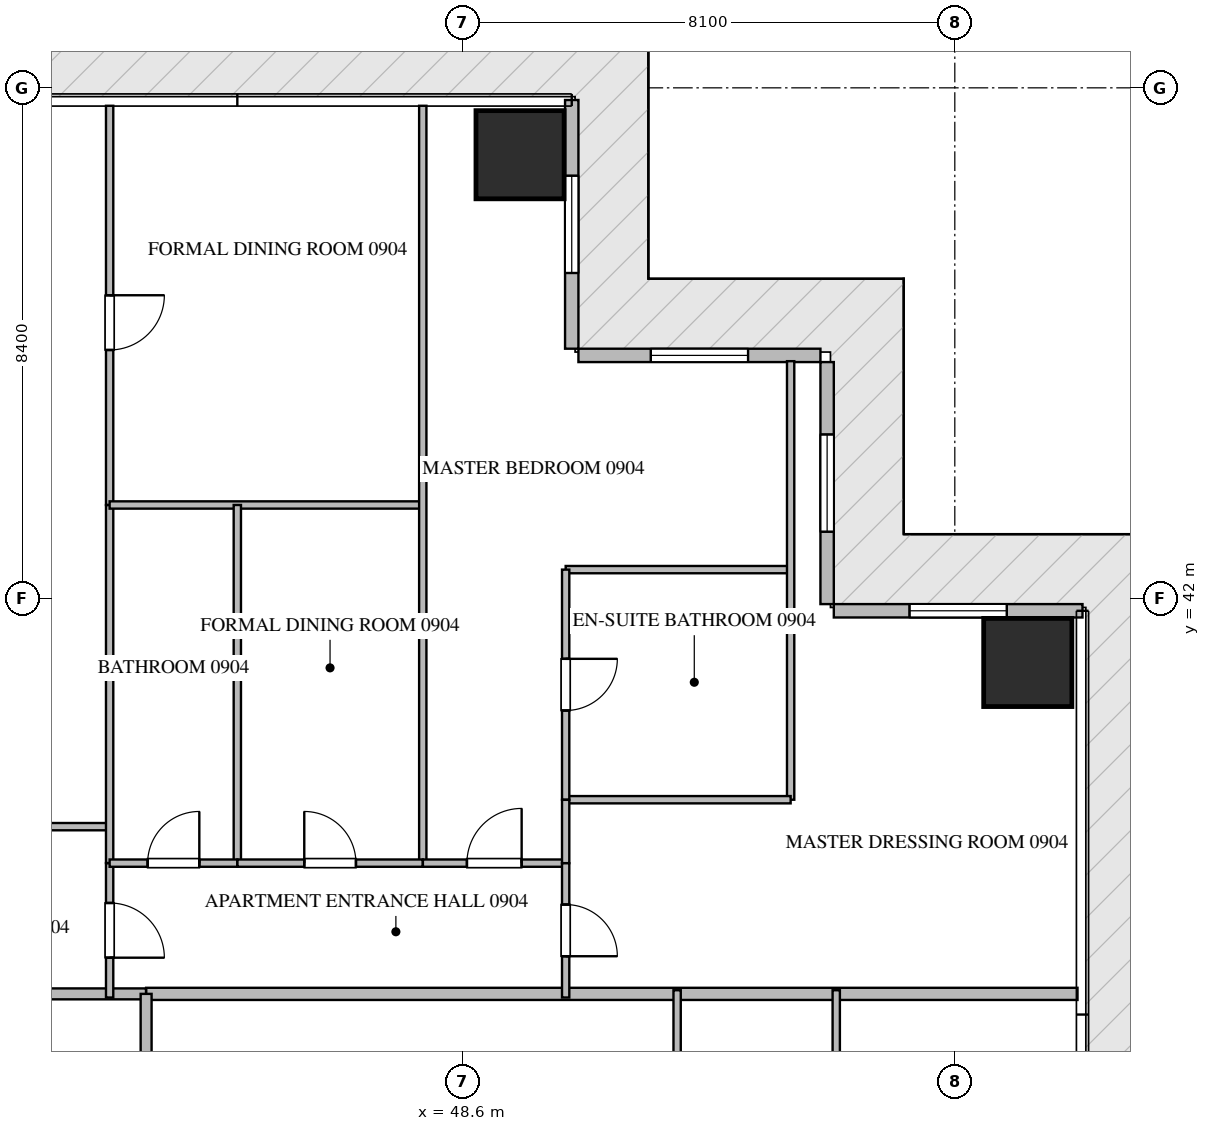
"""IFC4 building model, lengths in metres.
Left out: names, types, materials, properties, quantities, classifications, styles, units other than length and angle.
Written with IfcOpenShell. Run it as: python <this file> out.ifc"""

import sys

from ifc_helpers import new_model, si_unit, direction, frame, frame_2d, origin, origin_2d, place, context, subcontext, project, spatial, rectangle, extrude, source, transform, mapped, element, fill, save


model = new_model("IFC4")
c1 = context("Model", 3, precision=1e-05, world=origin(), true_north=direction((0.0, 1.0)))
c2 = subcontext(c1, "Body", "Model", "MODEL_VIEW")
j1 = project(units=[si_unit("LENGTHUNIT", "METRE"), si_unit("PLANEANGLEUNIT", "RADIAN")], contexts=[c1])
p1 = place(None, origin())
s1 = spatial("IfcSite", under=j1, at=p1, CompositionType="ELEMENT")
p2 = place(p1, origin())
s2 = spatial("IfcBuilding", under=s1, at=p2, CompositionType="ELEMENT")
p3 = place(p2, frame((0.0, 0.0, 41.7)))
s3 = spatial("IfcBuildingStorey", under=s2, at=p3, CompositionType="ELEMENT", Elevation=41.7)
m1 = source(origin(), c2, "Body", "SweptSolid", [
    extrude(rectangle(XDim=1.45, YDim=1.45, at=origin_2d()), origin(), (0.0, 0.0, 1.0), 3.75),
])
for number, where, z_axis, x_axis in (
    (1, (49.55, 49.3, -0.26), (0.0, 0.0, 1.0), (1.0, 0.0, 0.0)),
    (2, (57.9, 40.95, -0.26), (0.0, 0.0, 1.0), (1.0, 0.0, 0.0)),
):
    element("IfcColumn", number, at=place(p3, frame(where, z_axis=z_axis, x_axis=x_axis)), inside=s3, PredefinedType="COLUMN", context=c2, shape_type="MappedRepresentation", body=[
        mapped(m1, transform((0.0, 0.0, 0.0), scale=1.0)),
    ])
p4 = place(p3, frame((58.8, 41.8, 0.0), z_axis=(0.0, 0.0, 1.0), x_axis=(-1.0, 0.0, 0.0)))
e3 = element("IfcWall", 3, at=p4, inside=s3, PredefinedType="ELEMENTEDWALL", context=c2, shape_type="SweptSolid", body=[
    extrude(rectangle(XDim=4.09, YDim=0.22, at=frame_2d((2.045, 0.0))), origin(), (0.0, 0.0, 1.0), 3.475),
])
p5 = place(p4, frame((1.245, 0.0, 0.65)))
e4 = element("IfcOpeningElement", 4, at=p5, cuts=e3, PredefinedType="OPENING", context=c2, shape_type="SweptSolid", body=[
    extrude(rectangle(XDim=1.6, YDim=2.1, at=frame_2d((0.8, 1.05))), frame((0.0, 0.12, 0.0), z_axis=(0.0, -1.0, 0.0), x_axis=(1.0, 0.0, 0.0)), (0.0, 0.0, 1.0), 0.24),
])
p6 = place(p3, frame((54.6, 41.91, 0.0), z_axis=(0.0, 0.0, 1.0), x_axis=(0.0, 1.0, 0.0)))
e5 = element("IfcWall", 5, at=p6, inside=s3, PredefinedType="ELEMENTEDWALL", context=c2, shape_type="SweptSolid", body=[
    extrude(rectangle(XDim=3.98, YDim=0.22, at=frame_2d((1.99, 0.0))), origin(), (0.0, 0.0, 1.0), 3.475),
])
p7 = place(p6, frame((1.19, 0.0, 0.65)))
e6 = element("IfcOpeningElement", 6, at=p7, cuts=e5, PredefinedType="OPENING", context=c2, shape_type="SweptSolid", body=[
    extrude(rectangle(XDim=1.6, YDim=2.1, at=frame_2d((0.8, 1.05))), frame((0.0, 0.12, 0.0), z_axis=(0.0, -1.0, 0.0), x_axis=(1.0, 0.0, 0.0)), (0.0, 0.0, 1.0), 0.24),
])
p8 = place(p3, frame((54.49, 46.0, 0.0), z_axis=(0.0, 0.0, 1.0), x_axis=(-1.0, 0.0, 0.0)))
e7 = element("IfcWall", 7, at=p8, inside=s3, PredefinedType="ELEMENTEDWALL", context=c2, shape_type="SweptSolid", body=[
    extrude(rectangle(XDim=3.98, YDim=0.22, at=frame_2d((1.99, 0.0))), origin(), (0.0, 0.0, 1.0), 3.475),
])
p9 = place(p8, frame((1.19, 0.0, 0.65)))
e8 = element("IfcOpeningElement", 8, at=p9, cuts=e7, PredefinedType="OPENING", context=c2, shape_type="SweptSolid", body=[
    extrude(rectangle(XDim=1.6, YDim=2.1, at=frame_2d((0.8, 1.05))), frame((0.0, 0.12, 0.0), z_axis=(0.0, -1.0, 0.0), x_axis=(1.0, 0.0, 0.0)), (0.0, 0.0, 1.0), 0.24),
])
p10 = place(p3, frame((50.4, 46.11, 0.0), z_axis=(0.0, 0.0, 1.0), x_axis=(0.0, 1.0, 0.0)))
e9 = element("IfcWall", 9, at=p10, inside=s3, PredefinedType="ELEMENTEDWALL", context=c2, shape_type="SweptSolid", body=[
    extrude(rectangle(XDim=4.09, YDim=0.22, at=frame_2d((2.045, 0.0))), origin(), (0.0, 0.0, 1.0), 3.475),
])
p11 = place(p10, frame((1.245, 0.0, 0.65)))
e10 = element("IfcOpeningElement", 10, at=p11, cuts=e9, PredefinedType="OPENING", context=c2, shape_type="SweptSolid", body=[
    extrude(rectangle(XDim=1.6, YDim=2.1, at=frame_2d((0.8, 1.05))), frame((0.0, 0.12, 0.0), z_axis=(0.0, -1.0, 0.0), x_axis=(1.0, 0.0, 0.0)), (0.0, 0.0, 1.0), 0.24),
])
p12 = place(p3, frame((43.4, 35.5, 0.0), z_axis=(0.0, 0.0, 1.0), x_axis=(1.0, 0.0, 0.0)))
e11 = element("IfcWall", 11, at=p12, inside=s3, PredefinedType="PARTITIONING", context=c2, shape_type="SweptSolid", body=[
    extrude(rectangle(XDim=15.318, YDim=0.2, at=frame_2d((7.659, 0.0))), origin(), (0.0, 0.0, 1.0), 3.49),
])
p13 = place(p3, frame((21.402, 35.5, 0.0), z_axis=(0.0, 0.0, 1.0), x_axis=(1.0, 0.0, 0.0)))
e12 = element("IfcWall", 12, at=p13, inside=s3, PredefinedType="PARTITIONING", context=c2, shape_type="SweptSolid", body=[
    extrude(rectangle(XDim=21.996, YDim=0.18, at=frame_2d((10.998, 0.0))), origin(), (0.0, 0.0, 1.0), 3.49),
])
p14 = place(p13, frame((9.952, 0.0, 0.0)))
e13 = element("IfcOpeningElement", 13, at=p14, cuts=e12, PredefinedType="OPENING", context=c2, shape_type="SweptSolid", body=[
    extrude(rectangle(XDim=1.0, YDim=2.15, at=frame_2d((0.5, 1.075))), frame((0.0, 0.1, 0.0), z_axis=(0.0, -1.0, 0.0), x_axis=(1.0, 0.0, 0.0)), (0.0, 0.0, 1.0), 0.2),
])
p15 = place(p13, frame((15.18, 0.0, 0.0)))
e14 = element("IfcOpeningElement", 14, at=p15, cuts=e12, PredefinedType="OPENING", context=c2, shape_type="SweptSolid", body=[
    extrude(rectangle(XDim=1.0, YDim=2.15, at=frame_2d((0.5, 1.075))), frame((0.0, 0.1, 0.0), z_axis=(0.0, -1.0, 0.0), x_axis=(1.0, 0.0, 0.0)), (0.0, 0.0, 1.0), 0.2),
])
p16 = place(p3, frame((43.4, 14.9, 0.0), z_axis=(0.0, 0.0, 1.0), x_axis=(0.0, 1.0, 0.0)))
e15 = element("IfcWall", 15, at=p16, inside=s3, PredefinedType="PARTITIONING", context=c2, shape_type="SweptSolid", body=[
    extrude(rectangle(XDim=20.6, YDim=0.18, at=frame_2d((10.3, 0.0))), origin(), (0.0, 0.0, 1.0), 3.49),
])
p17 = place(p16, frame((1.96, 0.0, 0.0)))
e16 = element("IfcOpeningElement", 16, at=p17, cuts=e15, PredefinedType="OPENING", context=c2, shape_type="SweptSolid", body=[
    extrude(rectangle(XDim=1.0, YDim=2.15, at=frame_2d((0.5, 1.075))), frame((0.0, 0.1, 0.0), z_axis=(0.0, -1.0, 0.0), x_axis=(1.0, 0.0, 0.0)), (0.0, 0.0, 1.0), 0.2),
])
p18 = place(p3, frame((39.95, 38.25, 0.0), z_axis=(0.0, 0.0, 1.0), x_axis=(1.0, 0.0, 0.0)))
e17 = element("IfcWall", 17, at=p18, inside=s3, PredefinedType="PARTITIONING", context=c2, shape_type="SweptSolid", body=[
    extrude(rectangle(XDim=2.85, YDim=0.12, at=frame_2d((1.425, 0.0))), origin(), (0.0, 0.0, 1.0), 3.49),
])
p19 = place(p18, frame((1.0, 0.0, 0.0)))
e18 = element("IfcOpeningElement", 18, at=p19, cuts=e17, PredefinedType="OPENING", context=c2, shape_type="SweptSolid", body=[
    extrude(rectangle(XDim=0.85, YDim=2.1, at=frame_2d((0.425, 1.05))), frame((0.0, 0.07, 0.0), z_axis=(0.0, -1.0, 0.0), x_axis=(1.0, 0.0, 0.0)), (0.0, 0.0, 1.0), 0.14),
])
p20 = place(p3, frame((42.8, 37.65, 0.0), z_axis=(0.0, 0.0, 1.0), x_axis=(0.0, -1.0, 0.0)))
e19 = element("IfcWall", 19, at=p20, inside=s3, PredefinedType="PARTITIONING", context=c2, shape_type="SweptSolid", body=[
    extrude(rectangle(XDim=2.21, YDim=0.12, at=frame_2d((1.105, 0.0))), origin(), (0.0, 0.0, 1.0), 3.49),
])
p21 = place(p20, frame((0.655, 0.0, 0.0)))
e20 = element("IfcOpeningElement", 20, at=p21, cuts=e19, PredefinedType="OPENING", context=c2, shape_type="SweptSolid", body=[
    extrude(rectangle(XDim=0.9, YDim=2.1, at=frame_2d((0.45, 1.05))), frame((0.0, 0.07, 0.0), z_axis=(0.0, -1.0, 0.0), x_axis=(1.0, 0.0, 0.0)), (0.0, 0.0, 1.0), 0.14),
])
p22 = place(p3, frame((42.8, 50.105, 0.0), z_axis=(0.0, 0.0, 1.0), x_axis=(0.0, -1.0, 0.0)))
e21 = element("IfcWall", 21, at=p22, inside=s3, PredefinedType="PARTITIONING", context=c2, shape_type="SweptSolid", body=[
    extrude(rectangle(XDim=6.565, YDim=0.12, at=frame_2d((3.282, 0.0))), origin(), (0.0, 0.0, 1.0), 3.49),
])
p23 = place(p22, frame((3.116, 0.0, 0.0)))
e22 = element("IfcOpeningElement", 22, at=p23, cuts=e21, PredefinedType="OPENING", context=c2, shape_type="SweptSolid", body=[
    extrude(rectangle(XDim=0.9, YDim=2.1, at=frame_2d((0.45, 1.05))), frame((0.0, 0.07, 0.0), z_axis=(0.0, -1.0, 0.0), x_axis=(1.0, 0.0, 0.0)), (0.0, 0.0, 1.0), 0.14),
])
p24 = place(p3, frame((42.8, 43.538, 0.0), z_axis=(0.0, 0.0, 1.0), x_axis=(0.0, -1.0, 0.0)))
e23 = element("IfcWall", 23, at=p24, inside=s3, PredefinedType="PARTITIONING", context=c2, shape_type="SweptSolid", body=[
    extrude(rectangle(XDim=5.886, YDim=0.12, at=frame_2d((2.943, 0.0))), origin(), (0.0, 0.0, 1.0), 3.49),
])
p25 = place(p3, frame((42.8, 43.54, 0.0), z_axis=(0.0, 0.0, 1.0), x_axis=(1.0, 0.0, 0.0)))
e24 = element("IfcWall", 24, at=p25, inside=s3, PredefinedType="PARTITIONING", context=c2, shape_type="SweptSolid", body=[
    extrude(rectangle(XDim=5.15, YDim=0.12, at=frame_2d((2.575, 0.0))), origin(), (0.0, 0.0, 1.0), 3.49),
])
p26 = place(p3, frame((47.95, 50.105, 0.0), z_axis=(0.0, 0.0, 1.0), x_axis=(0.0, -1.0, 0.0)))
e25 = element("IfcWall", 25, at=p26, inside=s3, PredefinedType="PARTITIONING", context=c2, shape_type="SweptSolid", body=[
    extrude(rectangle(XDim=12.455, YDim=0.12, at=frame_2d((6.228, 0.0))), origin(), (0.0, 0.0, 1.0), 3.49),
])
p27 = place(p3, frame((44.9, 43.54, 0.0), z_axis=(0.0, 0.0, 1.0), x_axis=(0.0, -1.0, 0.0)))
e26 = element("IfcWall", 26, at=p27, inside=s3, PredefinedType="PARTITIONING", context=c2, shape_type="SweptSolid", body=[
    extrude(rectangle(XDim=5.89, YDim=0.12, at=frame_2d((2.945, 0.0))), origin(), (0.0, 0.0, 1.0), 3.49),
])
p28 = place(p3, frame((42.8, 37.65, 0.0), z_axis=(0.0, 0.0, 1.0), x_axis=(1.0, 0.0, 0.0)))
e27 = element("IfcWall", 27, at=p28, inside=s3, PredefinedType="PARTITIONING", context=c2, shape_type="SweptSolid", body=[
    extrude(rectangle(XDim=2.1, YDim=0.12, at=frame_2d((1.05, 0.0))), origin(), (0.0, 0.0, 1.0), 3.49),
])
p29 = place(p28, frame((0.625, 0.0, 0.0)))
e28 = element("IfcOpeningElement", 28, at=p29, cuts=e27, PredefinedType="OPENING", context=c2, shape_type="SweptSolid", body=[
    extrude(rectangle(XDim=0.85, YDim=2.1, at=frame_2d((0.425, 1.05))), frame((0.0, 0.07, 0.0), z_axis=(0.0, -1.0, 0.0), x_axis=(1.0, 0.0, 0.0)), (0.0, 0.0, 1.0), 0.14),
])
p30 = place(p3, frame((44.902, 37.65, 0.0), z_axis=(0.0, 0.0, 1.0), x_axis=(1.0, 0.0, 0.0)))
e29 = element("IfcWall", 29, at=p30, inside=s3, PredefinedType="PARTITIONING", context=c2, shape_type="SweptSolid", body=[
    extrude(rectangle(XDim=3.048, YDim=0.12, at=frame_2d((1.524, 0.0))), origin(), (0.0, 0.0, 1.0), 3.49),
])
p31 = place(p30, frame((1.099, 0.0, 0.0)))
e30 = element("IfcOpeningElement", 30, at=p31, cuts=e29, PredefinedType="OPENING", context=c2, shape_type="SweptSolid", body=[
    extrude(rectangle(XDim=0.85, YDim=2.1, at=frame_2d((0.425, 1.05))), frame((0.0, 0.07, 0.0), z_axis=(0.0, -1.0, 0.0), x_axis=(1.0, 0.0, 0.0)), (0.0, 0.0, 1.0), 0.14),
])
p32 = place(p3, frame((47.952, 37.65, 0.0), z_axis=(0.0, 0.0, 1.0), x_axis=(1.0, 0.0, 0.0)))
e31 = element("IfcWall", 31, at=p32, inside=s3, PredefinedType="PARTITIONING", context=c2, shape_type="SweptSolid", body=[
    extrude(rectangle(XDim=2.348, YDim=0.12, at=frame_2d((1.174, 0.0))), origin(), (0.0, 0.0, 1.0), 3.49),
])
p33 = place(p32, frame((0.724, 0.0, 0.0)))
e32 = element("IfcOpeningElement", 32, at=p33, cuts=e31, PredefinedType="OPENING", context=c2, shape_type="SweptSolid", body=[
    extrude(rectangle(XDim=0.9, YDim=2.1, at=frame_2d((0.45, 1.05))), frame((0.0, 0.07, 0.0), z_axis=(0.0, -1.0, 0.0), x_axis=(1.0, 0.0, 0.0)), (0.0, 0.0, 1.0), 0.14),
])
p34 = place(p3, frame((50.3, 42.477, 0.0), z_axis=(0.0, 0.0, 1.0), x_axis=(1.0, 0.0, 0.0)))
e33 = element("IfcWall", 33, at=p34, inside=s3, PredefinedType="PARTITIONING", context=c2, shape_type="SweptSolid", body=[
    extrude(rectangle(XDim=3.7, YDim=0.12, at=frame_2d((1.85, 0.0))), origin(), (0.0, 0.0, 1.0), 3.49),
])
p35 = place(p3, frame((54.0, 45.905, 0.0), z_axis=(0.0, 0.0, 1.0), x_axis=(0.0, -1.0, 0.0)))
e34 = element("IfcWall", 34, at=p35, inside=s3, PredefinedType="PARTITIONING", context=c2, shape_type="SweptSolid", body=[
    extrude(rectangle(XDim=7.212, YDim=0.12, at=frame_2d((3.606, 0.0))), origin(), (0.0, 0.0, 1.0), 3.49),
])
p36 = place(p3, frame((50.3, 38.693, 0.0), z_axis=(0.0, 0.0, 1.0), x_axis=(1.0, 0.0, 0.0)))
e35 = element("IfcWall", 35, at=p36, inside=s3, PredefinedType="PARTITIONING", context=c2, shape_type="SweptSolid", body=[
    extrude(rectangle(XDim=3.7, YDim=0.12, at=frame_2d((1.85, 0.0))), origin(), (0.0, 0.0, 1.0), 3.49),
])
p37 = place(p3, frame((50.3, 42.477, 0.0), z_axis=(0.0, 0.0, 1.0), x_axis=(0.0, -1.0, 0.0)))
e36 = element("IfcWall", 36, at=p37, inside=s3, PredefinedType="PARTITIONING", context=c2, shape_type="SweptSolid", body=[
    extrude(rectangle(XDim=3.784, YDim=0.12, at=frame_2d((1.892, 0.0))), origin(), (0.0, 0.0, 1.0), 3.49),
])
p38 = place(p37, frame((1.467, 0.0, 0.0)))
e37 = element("IfcOpeningElement", 37, at=p38, cuts=e36, PredefinedType="OPENING", context=c2, shape_type="SweptSolid", body=[
    extrude(rectangle(XDim=0.85, YDim=2.1, at=frame_2d((0.425, 1.05))), frame((0.0, 0.07, 0.0), z_axis=(0.0, -1.0, 0.0), x_axis=(1.0, 0.0, 0.0)), (0.0, 0.0, 1.0), 0.14),
])
p39 = place(p3, frame((50.3, 38.691, 0.0), z_axis=(0.0, 0.0, 1.0), x_axis=(0.0, -1.0, 0.0)))
e38 = element("IfcWall", 38, at=p39, inside=s3, PredefinedType="PARTITIONING", context=c2, shape_type="SweptSolid", body=[
    extrude(rectangle(XDim=1.041, YDim=0.12, at=frame_2d((0.521, 0.0))), origin(), (0.0, 0.0, 1.0), 3.49),
])
p40 = place(p3, frame((50.3, 37.648, 0.0), z_axis=(0.0, 0.0, 1.0), x_axis=(0.0, -1.0, 0.0)))
e39 = element("IfcWall", 39, at=p40, inside=s3, PredefinedType="PARTITIONING", context=c2, shape_type="SweptSolid", body=[
    extrude(rectangle(XDim=2.208, YDim=0.12, at=frame_2d((1.104, 0.0))), origin(), (0.0, 0.0, 1.0), 3.49),
])
p41 = place(p40, frame((0.679, 0.0, 0.0)))
e40 = element("IfcOpeningElement", 40, at=p41, cuts=e39, PredefinedType="OPENING", context=c2, shape_type="SweptSolid", body=[
    extrude(rectangle(XDim=0.85, YDim=2.1, at=frame_2d((0.425, 1.05))), frame((0.0, 0.07, 0.0), z_axis=(0.0, -1.0, 0.0), x_axis=(1.0, 0.0, 0.0)), (0.0, 0.0, 1.0), 0.14),
])
for number, where, z_axis, x_axis in (
    (41, (54.75, 30.15, 0.0), (0.0, 0.0, 1.0), (0.0, 1.0, 0.0)),
    (42, (52.133, 30.15, 0.0), (0.0, 0.0, 1.0), (0.0, 1.0, 0.0)),
):
    element("IfcWall", number, at=place(p3, frame(where, z_axis=z_axis, x_axis=x_axis)), inside=s3, PredefinedType="PARTITIONING", context=c2, shape_type="SweptSolid", body=[
        extrude(rectangle(XDim=5.41, YDim=0.12, at=frame_2d((2.705, 0.0))), origin(), (0.0, 0.0, 1.0), 3.49),
    ])
m2 = source(origin(), c2, "Body", "SweptSolid", [
    extrude(rectangle(XDim=1.6, YDim=2.1, at=frame_2d((0.8, 1.05))), frame((0.0, 0.03, 0.0), z_axis=(0.0, -1.0, 0.0), x_axis=(1.0, 0.0, 0.0)), (0.0, 0.0, 1.0), 0.06),
])
p42 = place(p5, origin())
e43 = element("IfcWindow", 43, at=p42, inside=s3, PartitioningType="SINGLE_PANEL", PredefinedType="WINDOW", context=c2, shape_type="MappedRepresentation", body=[
    mapped(m2, transform((0.0, 0.0, 0.0), scale=1.0)),
])
fill(e4, e43)
p43 = place(p7, origin())
e44 = element("IfcWindow", 44, at=p43, inside=s3, PartitioningType="SINGLE_PANEL", PredefinedType="WINDOW", context=c2, shape_type="MappedRepresentation", body=[
    mapped(m2, transform((0.0, 0.0, 0.0), scale=1.0)),
])
fill(e6, e44)
p44 = place(p9, origin())
e45 = element("IfcWindow", 45, at=p44, inside=s3, PartitioningType="SINGLE_PANEL", PredefinedType="WINDOW", context=c2, shape_type="MappedRepresentation", body=[
    mapped(m2, transform((0.0, 0.0, 0.0), scale=1.0)),
])
fill(e8, e45)
p45 = place(p11, origin())
e46 = element("IfcWindow", 46, at=p45, inside=s3, PartitioningType="SINGLE_PANEL", PredefinedType="WINDOW", context=c2, shape_type="MappedRepresentation", body=[
    mapped(m2, transform((0.0, 0.0, 0.0), scale=1.0)),
])
fill(e10, e46)
m3 = source(origin(), c2, "Body", "SweptSolid", [
    extrude(rectangle(XDim=0.9, YDim=2.1, at=frame_2d((0.45, 1.05))), frame((0.0, 0.025, 0.0), z_axis=(0.0, -1.0, 0.0), x_axis=(1.0, 0.0, 0.0)), (0.0, 0.0, 1.0), 0.05),
])
p46 = place(p21, origin())
e47 = element("IfcDoor", 47, at=p46, inside=s3, OperationType="SINGLE_SWING_RIGHT", PredefinedType="DOOR", context=c2, shape_type="MappedRepresentation", body=[
    mapped(m3, transform((0.0, 0.0, 0.0), scale=1.0)),
])
fill(e20, e47)
p47 = place(p23, origin())
e48 = element("IfcDoor", 48, at=p47, inside=s3, OperationType="SINGLE_SWING_LEFT", PredefinedType="DOOR", context=c2, shape_type="MappedRepresentation", body=[
    mapped(m3, transform((0.0, 0.0, 0.0), scale=1.0)),
])
fill(e22, e48)
m4 = source(origin(), c2, "Body", "SweptSolid", [
    extrude(rectangle(XDim=0.85, YDim=2.1, at=frame_2d((0.425, 1.05))), frame((0.0, 0.025, 0.0), z_axis=(0.0, -1.0, 0.0), x_axis=(1.0, 0.0, 0.0)), (0.0, 0.0, 1.0), 0.05),
])
p48 = place(p29, origin())
e49 = element("IfcDoor", 49, at=p48, inside=s3, OperationType="SINGLE_SWING_RIGHT", PredefinedType="DOOR", context=c2, shape_type="MappedRepresentation", body=[
    mapped(m4, transform((0.0, 0.0, 0.0), scale=1.0)),
])
fill(e28, e49)
p49 = place(p31, origin())
e50 = element("IfcDoor", 50, at=p49, inside=s3, OperationType="SINGLE_SWING_LEFT", PredefinedType="DOOR", context=c2, shape_type="MappedRepresentation", body=[
    mapped(m4, transform((0.0, 0.0, 0.0), scale=1.0)),
])
fill(e30, e50)
p50 = place(p33, origin())
e51 = element("IfcDoor", 51, at=p50, inside=s3, OperationType="SINGLE_SWING_RIGHT", PredefinedType="DOOR", context=c2, shape_type="MappedRepresentation", body=[
    mapped(m3, transform((0.0, 0.0, 0.0), scale=1.0)),
])
fill(e32, e51)
p51 = place(p38, origin())
e52 = element("IfcDoor", 52, at=p51, inside=s3, OperationType="SINGLE_SWING_LEFT", PredefinedType="DOOR", context=c2, shape_type="MappedRepresentation", body=[
    mapped(m4, transform((0.0, 0.0, 0.0), scale=1.0)),
])
fill(e37, e52)
p52 = place(p41, origin())
e53 = element("IfcDoor", 53, at=p52, inside=s3, OperationType="SINGLE_SWING_RIGHT", PredefinedType="DOOR", context=c2, shape_type="MappedRepresentation", body=[
    mapped(m4, transform((0.0, 0.0, 0.0), scale=1.0)),
])
fill(e40, e53)
save(model, sys.argv[1])
